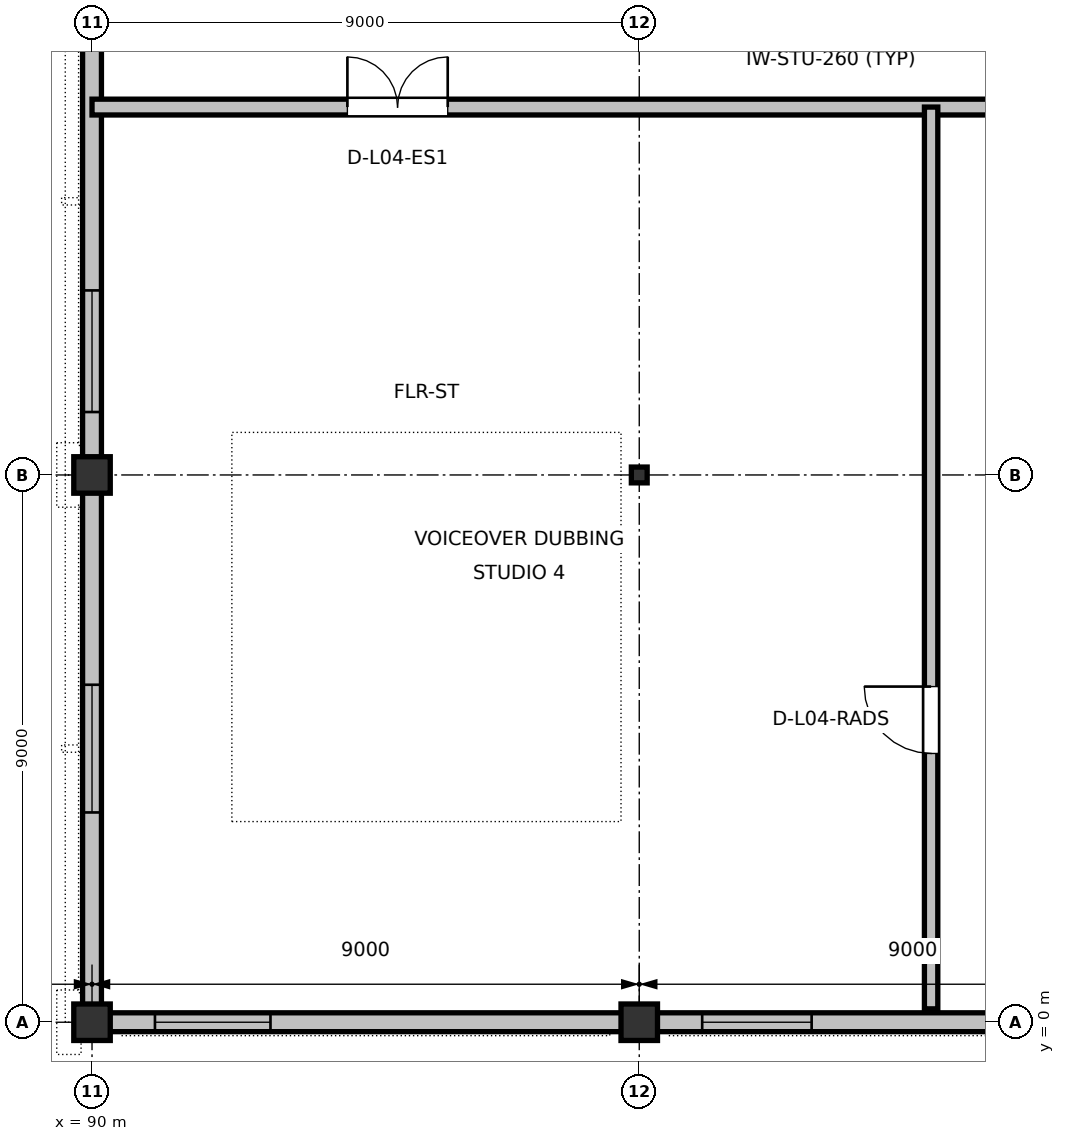
"""IFC4 building model, lengths in metres.
Left out: names, types, materials, properties, quantities, classifications, styles, units other than length and angle.
Written with IfcOpenShell. Run it as: python <this file> out.ifc"""

import sys

from ifc_helpers import new_model, si_unit, direction, frame, frame_2d, origin, origin_2d, place, context, subcontext, project, spatial, rectangle, i_section, extrude, element, fill, save


model = new_model("IFC4")
c1 = context("Model", 3, precision=1e-05, world=origin(), true_north=direction((0.0, 1.0)))
c2 = subcontext(c1, "Body", "Model", "MODEL_VIEW")
j1 = project(units=[si_unit("LENGTHUNIT", "METRE"), si_unit("PLANEANGLEUNIT", "RADIAN")], contexts=[c1])
p1 = place(None, origin())
s1 = spatial("IfcSite", under=j1, at=p1, CompositionType="ELEMENT")
p2 = place(p1, origin())
s2 = spatial("IfcBuilding", under=s1, at=p2, CompositionType="ELEMENT")
p3 = place(p2, frame((0.0, 0.0, 19.2)))
s3 = spatial("IfcBuildingStorey", under=s2, at=p3, CompositionType="ELEMENT", Elevation=19.2)
for number, where, z_axis, x_axis in (
    (1, (90.0, 0.0, 0.0), (0.0, 0.0, 1.0), (1.0, 0.0, 0.0)),
    (2, (90.0, 9.0, 0.0), (0.0, 0.0, 1.0), (1.0, 0.0, 0.0)),
    (3, (99.0, 0.0, 0.0), (0.0, 0.0, 1.0), (1.0, 0.0, 0.0)),
):
    element("IfcColumn", number, at=place(p3, frame(where, z_axis=z_axis, x_axis=x_axis)), inside=s3, PredefinedType="COLUMN", context=c2, shape_type="SweptSolid", body=[
        extrude(rectangle(XDim=0.6, YDim=0.6, at=origin_2d()), origin(), (0.0, 0.0, 1.0), 4.2),
    ])
p4 = place(p3, frame((99.0, 9.0, 0.0), z_axis=(0.0, 0.0, 1.0), x_axis=(1.0, 0.0, 0.0)))
e4 = element("IfcColumn", 4, at=p4, inside=s3, PredefinedType="COLUMN", context=c2, shape_type="SweptSolid", body=[
    extrude(i_section(OverallWidth=0.26, OverallDepth=0.26, WebThickness=0.01, FlangeThickness=0.018, at=origin_2d()), origin(), (0.0, 0.0, 1.0), 4.2),
])
p5 = place(p3, frame((90.0, 8.715, 0.0), z_axis=(0.0, 0.0, 1.0), x_axis=(0.0, -1.0, 0.0)))
e5 = element("IfcWall", 5, at=p5, inside=s3, PredefinedType="STANDARD", context=c2, shape_type="SweptSolid", body=[
    extrude(rectangle(XDim=8.43, YDim=0.31, at=frame_2d((4.215, 0.0))), origin(), (0.0, 0.0, 1.0), 3.635),
])
p6 = place(p5, frame((3.165, 0.0, 0.9)))
e6 = element("IfcOpeningElement", 6, at=p6, cuts=e5, PredefinedType="OPENING", context=c2, shape_type="SweptSolid", body=[
    extrude(rectangle(XDim=2.1, YDim=2.25, at=frame_2d((1.05, 1.125))), frame((0.0, 0.165, 0.0), z_axis=(0.0, -1.0, 0.0), x_axis=(1.0, 0.0, 0.0)), (0.0, 0.0, 1.0), 0.33),
])
p7 = place(p3, frame((90.0, 17.715, 0.0), z_axis=(0.0, 0.0, 1.0), x_axis=(0.0, -1.0, 0.0)))
e7 = element("IfcWall", 7, at=p7, inside=s3, PredefinedType="STANDARD", context=c2, shape_type="SweptSolid", body=[
    extrude(rectangle(XDim=8.43, YDim=0.31, at=frame_2d((4.215, 0.0))), origin(), (0.0, 0.0, 1.0), 3.635),
])
p8 = place(p7, frame((5.68, 0.0, 0.9)))
e8 = element("IfcOpeningElement", 8, at=p8, cuts=e7, PredefinedType="OPENING", context=c2, shape_type="SweptSolid", body=[
    extrude(rectangle(XDim=2.0, YDim=2.2, at=frame_2d((1.0, 1.1))), frame((0.0, 0.165, 0.0), z_axis=(0.0, -1.0, 0.0), x_axis=(1.0, 0.0, 0.0)), (0.0, 0.0, 1.0), 0.33),
])
p9 = place(p3, frame((90.285, 0.0, 0.0), z_axis=(0.0, 0.0, 1.0), x_axis=(1.0, 0.0, 0.0)))
e9 = element("IfcWall", 9, at=p9, inside=s3, PredefinedType="STANDARD", context=c2, shape_type="SweptSolid", body=[
    extrude(rectangle(XDim=8.43, YDim=0.31, at=frame_2d((4.215, 0.0))), origin(), (0.0, 0.0, 1.0), 3.635),
])
p10 = place(p9, frame((0.75, 0.0, 0.9)))
e10 = element("IfcOpeningElement", 10, at=p10, cuts=e9, PredefinedType="OPENING", context=c2, shape_type="SweptSolid", body=[
    extrude(rectangle(XDim=1.9, YDim=2.15, at=frame_2d((0.95, 1.075))), frame((0.0, 0.165, 0.0), z_axis=(0.0, -1.0, 0.0), x_axis=(1.0, 0.0, 0.0)), (0.0, 0.0, 1.0), 0.33),
])
p11 = place(p3, frame((99.285, 0.0, 0.0), z_axis=(0.0, 0.0, 1.0), x_axis=(1.0, 0.0, 0.0)))
e11 = element("IfcWall", 11, at=p11, inside=s3, PredefinedType="STANDARD", context=c2, shape_type="SweptSolid", body=[
    extrude(rectangle(XDim=8.43, YDim=0.31, at=frame_2d((4.215, 0.0))), origin(), (0.0, 0.0, 1.0), 3.635),
])
p12 = place(p11, frame((0.75, 0.0, 0.9)))
e12 = element("IfcOpeningElement", 12, at=p12, cuts=e11, PredefinedType="OPENING", context=c2, shape_type="SweptSolid", body=[
    extrude(rectangle(XDim=1.8, YDim=2.1, at=frame_2d((0.9, 1.05))), frame((0.0, 0.165, 0.0), z_axis=(0.0, -1.0, 0.0), x_axis=(1.0, 0.0, 0.0)), (0.0, 0.0, 1.0), 0.33),
])
p13 = place(p3, frame((90.0, 15.05, 0.0), z_axis=(0.0, 0.0, 1.0), x_axis=(1.0, 0.0, 0.0)))
e13 = element("IfcWall", 13, at=p13, inside=s3, PredefinedType="PARTITIONING", context=c2, shape_type="SweptSolid", body=[
    extrude(rectangle(XDim=24.3, YDim=0.26, at=frame_2d((12.15, 0.0))), origin(), (0.0, 0.0, 1.0), 3.675),
])
p14 = place(p13, frame((4.2, 0.0, 0.0)))
e14 = element("IfcOpeningElement", 14, at=p14, cuts=e13, PredefinedType="OPENING", context=c2, shape_type="SweptSolid", body=[
    extrude(rectangle(XDim=1.65, YDim=2.25, at=frame_2d((0.825, 1.125))), frame((0.0, 0.14, 0.0), z_axis=(0.0, -1.0, 0.0), x_axis=(1.0, 0.0, 0.0)), (0.0, 0.0, 1.0), 0.28),
])
p15 = place(p13, frame((16.5, 0.0, 0.0)))
e15 = element("IfcOpeningElement", 15, at=p15, cuts=e13, PredefinedType="OPENING", context=c2, shape_type="SweptSolid", body=[
    extrude(rectangle(XDim=1.45, YDim=2.22, at=frame_2d((0.725, 1.11))), frame((0.0, 0.14, 0.0), z_axis=(0.0, -1.0, 0.0), x_axis=(1.0, 0.0, 0.0)), (0.0, 0.0, 1.0), 0.28),
])
p16 = place(p3, frame((103.8, 0.22, 0.0), z_axis=(0.0, 0.0, 1.0), x_axis=(0.0, 1.0, 0.0)))
e16 = element("IfcWall", 16, at=p16, inside=s3, PredefinedType="PARTITIONING", context=c2, shape_type="SweptSolid", body=[
    extrude(rectangle(XDim=14.83, YDim=0.22, at=frame_2d((7.415, 0.0))), origin(), (0.0, 0.0, 1.0), 3.96),
])
p17 = place(p16, frame((4.2, 0.0, 0.0)))
e17 = element("IfcOpeningElement", 17, at=p17, cuts=e16, PredefinedType="OPENING", context=c2, shape_type="SweptSolid", body=[
    extrude(rectangle(XDim=1.1, YDim=2.16, at=frame_2d((0.55, 1.08))), frame((0.0, 0.12, 0.0), z_axis=(0.0, -1.0, 0.0), x_axis=(1.0, 0.0, 0.0)), (0.0, 0.0, 1.0), 0.24),
])
p18 = place(p6, origin())
e18 = element("IfcWindow", 18, at=p18, inside=s3, PartitioningType="SINGLE_PANEL", PredefinedType="WINDOW", context=c2, shape_type="SweptSolid", body=[
    extrude(rectangle(XDim=2.1, YDim=2.25, at=frame_2d((1.05, 1.125))), frame((0.0, 0.03, 0.0), z_axis=(0.0, -1.0, 0.0), x_axis=(1.0, 0.0, 0.0)), (0.0, 0.0, 1.0), 0.06),
])
fill(e6, e18)
p19 = place(p8, origin())
e19 = element("IfcWindow", 19, at=p19, inside=s3, PartitioningType="SINGLE_PANEL", PredefinedType="WINDOW", context=c2, shape_type="SweptSolid", body=[
    extrude(rectangle(XDim=2.0, YDim=2.2, at=frame_2d((1.0, 1.1))), frame((0.0, 0.03, 0.0), z_axis=(0.0, -1.0, 0.0), x_axis=(1.0, 0.0, 0.0)), (0.0, 0.0, 1.0), 0.06),
])
fill(e8, e19)
p20 = place(p10, origin())
e20 = element("IfcWindow", 20, at=p20, inside=s3, PartitioningType="SINGLE_PANEL", PredefinedType="WINDOW", context=c2, shape_type="SweptSolid", body=[
    extrude(rectangle(XDim=1.9, YDim=2.15, at=frame_2d((0.95, 1.075))), frame((0.0, 0.03, 0.0), z_axis=(0.0, -1.0, 0.0), x_axis=(1.0, 0.0, 0.0)), (0.0, 0.0, 1.0), 0.06),
])
fill(e10, e20)
p21 = place(p12, origin())
e21 = element("IfcWindow", 21, at=p21, inside=s3, PartitioningType="SINGLE_PANEL", PredefinedType="WINDOW", context=c2, shape_type="SweptSolid", body=[
    extrude(rectangle(XDim=1.8, YDim=2.1, at=frame_2d((0.9, 1.05))), frame((0.0, 0.03, 0.0), z_axis=(0.0, -1.0, 0.0), x_axis=(1.0, 0.0, 0.0)), (0.0, 0.0, 1.0), 0.06),
])
fill(e12, e21)
p22 = place(p14, origin())
e22 = element("IfcDoor", 22, at=p22, inside=s3, OperationType="DOUBLE_DOOR_SINGLE_SWING", PredefinedType="DOOR", context=c2, shape_type="SweptSolid", body=[
    extrude(rectangle(XDim=1.65, YDim=2.25, at=frame_2d((0.825, 1.125))), frame((0.0, 0.025, 0.0), z_axis=(0.0, -1.0, 0.0), x_axis=(1.0, 0.0, 0.0)), (0.0, 0.0, 1.0), 0.05),
])
fill(e14, e22)
p23 = place(p17, origin())
e23 = element("IfcDoor", 23, at=p23, inside=s3, OperationType="SINGLE_SWING_RIGHT", PredefinedType="DOOR", context=c2, shape_type="SweptSolid", body=[
    extrude(rectangle(XDim=1.1, YDim=2.16, at=frame_2d((0.55, 1.08))), frame((0.0, 0.025, 0.0), z_axis=(0.0, -1.0, 0.0), x_axis=(1.0, 0.0, 0.0)), (0.0, 0.0, 1.0), 0.05),
])
fill(e17, e23)
save(model, sys.argv[1])
